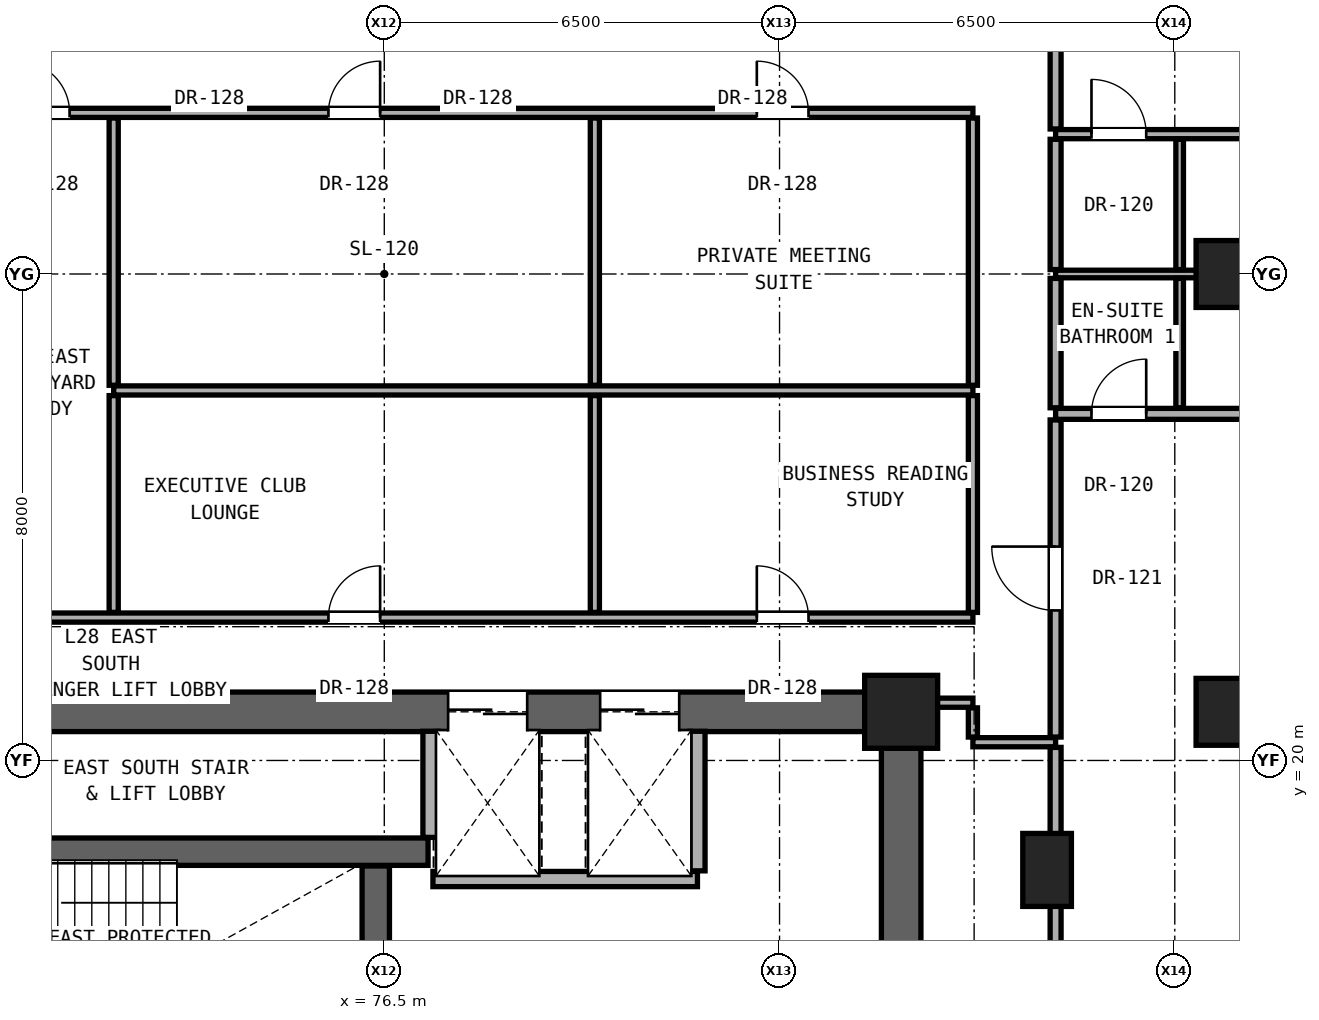
"""IFC4 building model, lengths in metres.
Left out: names, types, materials, properties, quantities, classifications, styles, units other than length and angle.
Written with IfcOpenShell. Run it as: python <this file> out.ifc"""

import sys

from ifc_helpers import new_model, si_unit, direction, frame, frame_2d, origin, origin_2d, place, context, subcontext, project, spatial, rectangle, hollow_rectangle, extrude, element, fill, save


model = new_model("IFC4")
c1 = context("Model", 3, precision=1e-05, world=origin(), true_north=direction((0.0, 1.0)))
c2 = subcontext(c1, "Body", "Model", "MODEL_VIEW")
j1 = project(units=[si_unit("LENGTHUNIT", "METRE"), si_unit("PLANEANGLEUNIT", "RADIAN")], contexts=[c1])
p1 = place(None, origin())
s1 = spatial("IfcSite", under=j1, at=p1, CompositionType="ELEMENT")
p2 = place(p1, origin())
s2 = spatial("IfcBuilding", under=s1, at=p2, CompositionType="ELEMENT")
p3 = place(p2, frame((0.0, 0.0, 101.6)))
s3 = spatial("IfcBuildingStorey", under=s2, at=p3, CompositionType="ELEMENT", Elevation=101.6)
p4 = place(p3, frame((85.0, 20.8, 0.0), z_axis=(0.0, 0.0, 1.0), x_axis=(1.0, 0.0, 0.0)))
e1 = element("IfcColumn", 1, at=p4, inside=s3, PredefinedType="COLUMN", context=c2, shape_type="SweptSolid", body=[
    extrude(rectangle(XDim=1.2, YDim=1.2, at=origin_2d()), origin(), (0.0, 0.0, 1.0), 3.3),
])
for number, where, z_axis, x_axis in (
    (2, (90.4, 20.8, 0.0), (0.0, 0.0, 1.0), (1.0, 0.0, 0.0)),
    (3, (90.4, 28.0, 0.0), (0.0, 0.0, 1.0), (1.0, 0.0, 0.0)),
):
    element("IfcColumn", number, at=place(p3, frame(where, z_axis=z_axis, x_axis=x_axis)), inside=s3, PredefinedType="COLUMN", context=c2, shape_type="SweptSolid", body=[
        extrude(hollow_rectangle(XDim=1.1, YDim=1.1, WallThickness=0.06, at=origin_2d()), origin(), (0.0, 0.0, 1.0), 3.3),
    ])
p5 = place(p3, frame((87.4, 18.2, 0.0), z_axis=(0.0, 0.0, 1.0), x_axis=(1.0, 0.0, 0.0)))
e4 = element("IfcColumn", 4, at=p5, inside=s3, PredefinedType="PILASTER", context=c2, shape_type="SweptSolid", body=[
    extrude(rectangle(XDim=0.8, YDim=1.2, at=origin_2d()), origin(), (0.0, 0.0, 1.0), 3.3),
])
p6 = place(p3, frame((85.0, 15.2, 0.0), z_axis=(0.0, 0.0, 1.0), x_axis=(0.0, 1.0, 0.0)))
e5 = element("IfcWall", 5, at=p6, inside=s3, PredefinedType="SHEAR", context=c2, shape_type="SweptSolid", body=[
    extrude(rectangle(XDim=5.6, YDim=0.65, at=frame_2d((2.8, 0.0))), origin(), (0.0, 0.0, 1.0), 3.08),
])
p7 = place(p3, frame((68.0, 20.8, 0.0), z_axis=(0.0, 0.0, 1.0), x_axis=(1.0, 0.0, 0.0)))
e6 = element("IfcWall", 6, at=p7, inside=s3, PredefinedType="SHEAR", context=c2, shape_type="SweptSolid", body=[
    extrude(rectangle(XDim=17.0, YDim=0.65, at=frame_2d((8.5, 0.0))), origin(), (0.0, 0.0, 1.0), 3.08),
])
p8 = place(p7, frame((9.55, 0.0, 0.0)))
e7 = element("IfcOpeningElement", 7, at=p8, cuts=e6, PredefinedType="OPENING", context=c2, shape_type="SweptSolid", body=[
    extrude(rectangle(XDim=1.3, YDim=2.3, at=frame_2d((0.65, 1.15))), frame((0.0, 0.335, 0.0), z_axis=(0.0, -1.0, 0.0), x_axis=(1.0, 0.0, 0.0)), (0.0, 0.0, 1.0), 0.67),
])
p9 = place(p7, frame((12.05, 0.0, 0.0)))
e8 = element("IfcOpeningElement", 8, at=p9, cuts=e6, PredefinedType="OPENING", context=c2, shape_type="SweptSolid", body=[
    extrude(rectangle(XDim=1.3, YDim=2.3, at=frame_2d((0.65, 1.15))), frame((0.0, 0.335, 0.0), z_axis=(0.0, -1.0, 0.0), x_axis=(1.0, 0.0, 0.0)), (0.0, 0.0, 1.0), 0.67),
])
p10 = place(p3, frame((77.3, 18.05, 0.0), z_axis=(0.0, 0.0, 1.0), x_axis=(1.0, 0.0, 0.0)))
e9 = element("IfcWall", 9, at=p10, inside=s3, PredefinedType="SOLIDWALL", context=c2, shape_type="SweptSolid", body=[
    extrude(rectangle(XDim=4.35, YDim=0.25, at=frame_2d((2.175, 0.0))), origin(), (0.0, 0.0, 1.0), 3.08),
])
p11 = place(p3, frame((68.32, 18.5, 0.0), z_axis=(0.0, 0.0, 1.0), x_axis=(1.0, 0.0, 0.0)))
e10 = element("IfcWall", 10, at=p11, inside=s3, PredefinedType="SHEAR", context=c2, shape_type="SweptSolid", body=[
    extrude(rectangle(XDim=8.9, YDim=0.45, at=frame_2d((4.45, 0.0))), origin(), (0.0, 0.0, 1.0), 3.08),
])
p12 = place(p11, frame((0.495, 0.0, 0.0)))
e11 = element("IfcOpeningElement", 11, at=p12, cuts=e10, PredefinedType="OPENING", context=c2, shape_type="SweptSolid", body=[
    extrude(rectangle(XDim=1.15, YDim=2.2, at=frame_2d((0.575, 1.1))), frame((0.0, 0.235, 0.0), z_axis=(0.0, -1.0, 0.0), x_axis=(1.0, 0.0, 0.0)), (0.0, 0.0, 1.0), 0.47),
])
p13 = place(p3, frame((86.18, 20.3, 0.0), z_axis=(0.0, 0.0, 1.0), x_axis=(1.0, 0.0, 0.0)))
e12 = element("IfcWall", 12, at=p13, inside=s3, PredefinedType="PARTITIONING", context=c2, shape_type="SweptSolid", body=[
    extrude(rectangle(XDim=1.36, YDim=0.15, at=frame_2d((0.68, 0.0))), origin(), (0.0, 0.0, 1.0), 3.08),
])
p14 = place(p3, frame((85.32, 20.95, 0.0), z_axis=(0.0, 0.0, 1.0), x_axis=(1.0, 0.0, 0.0)))
e13 = element("IfcWall", 13, at=p14, inside=s3, PredefinedType="PARTITIONING", context=c2, shape_type="SweptSolid", body=[
    extrude(rectangle(XDim=0.86, YDim=0.15, at=frame_2d((0.43, 0.0))), origin(), (0.0, 0.0, 1.0), 2.472),
])
p15 = place(p3, frame((66.68, 22.35, 0.0), z_axis=(0.0, 0.0, 1.0), x_axis=(1.0, 0.0, 0.0)))
e14 = element("IfcWall", 14, at=p15, inside=s3, PredefinedType="PARTITIONING", context=c2, shape_type="SweptSolid", body=[
    extrude(rectangle(XDim=19.5, YDim=0.15, at=frame_2d((9.75, 0.0))), origin(), (0.0, 0.0, 1.0), 2.145),
])
p16 = place(p15, frame((8.902, 0.0, 0.0)))
e15 = element("IfcOpeningElement", 15, at=p16, cuts=e14, PredefinedType="OPENING", context=c2, shape_type="SweptSolid", body=[
    extrude(rectangle(XDim=0.85, YDim=2.01, at=frame_2d((0.425, 1.005))), frame((0.0, 0.085, 0.0), z_axis=(0.0, -1.0, 0.0), x_axis=(1.0, 0.0, 0.0)), (0.0, 0.0, 1.0), 0.17),
])
p17 = place(p15, frame((15.947, 0.0, 0.0)))
e16 = element("IfcOpeningElement", 16, at=p17, cuts=e14, PredefinedType="OPENING", context=c2, shape_type="SweptSolid", body=[
    extrude(rectangle(XDim=0.85, YDim=2.01, at=frame_2d((0.425, 1.005))), frame((0.0, 0.085, 0.0), z_axis=(0.0, -1.0, 0.0), x_axis=(1.0, 0.0, 0.0)), (0.0, 0.0, 1.0), 0.17),
])
p18 = place(p3, frame((87.54, 25.7, 0.0), z_axis=(0.0, 0.0, 1.0), x_axis=(1.0, 0.0, 0.0)))
e17 = element("IfcWall", 17, at=p18, inside=s3, PredefinedType="PARTITIONING", context=c2, shape_type="SweptSolid", body=[
    extrude(rectangle(XDim=7.054, YDim=0.18, at=frame_2d((3.527, 0.0))), origin(), (0.0, 0.0, 1.0), 2.216),
])
p19 = place(p18, frame((4.052, 0.0, 0.0)))
e18 = element("IfcOpeningElement", 18, at=p19, cuts=e17, PredefinedType="OPENING", context=c2, shape_type="SweptSolid", body=[
    extrude(rectangle(XDim=0.95, YDim=2.15, at=frame_2d((0.475, 1.075))), frame((0.0, 0.1, 0.0), z_axis=(0.0, -1.0, 0.0), x_axis=(1.0, 0.0, 0.0)), (0.0, 0.0, 1.0), 0.2),
])
p20 = place(p18, frame((0.59, 0.0, 0.0)))
e19 = element("IfcOpeningElement", 19, at=p20, cuts=e17, PredefinedType="OPENING", context=c2, shape_type="SweptSolid", body=[
    extrude(rectangle(XDim=0.9, YDim=2.1, at=frame_2d((0.45, 1.05))), frame((0.0, 0.1, 0.0), z_axis=(0.0, -1.0, 0.0), x_axis=(1.0, 0.0, 0.0)), (0.0, 0.0, 1.0), 0.2),
])
p21 = place(p3, frame((72.05, 26.085, 0.0), z_axis=(0.0, 0.0, 1.0), x_axis=(1.0, 0.0, 0.0)))
e20 = element("IfcWall", 20, at=p21, inside=s3, PredefinedType="PARTITIONING", context=c2, shape_type="SweptSolid", body=[
    extrude(rectangle(XDim=14.13, YDim=0.15, at=frame_2d((7.065, 0.0))), origin(), (0.0, 0.0, 1.0), 2.145),
])
p22 = place(p3, frame((87.54, 28.0, 0.0), z_axis=(0.0, 0.0, 1.0), x_axis=(1.0, 0.0, 0.0)))
e21 = element("IfcWall", 21, at=p22, inside=s3, PredefinedType="PARTITIONING", context=c2, shape_type="SweptSolid", body=[
    extrude(rectangle(XDim=7.054, YDim=0.125, at=frame_2d((3.527, 0.0))), origin(), (0.0, 0.0, 1.0), 2.216),
])
p23 = place(p3, frame((87.54, 30.3, 0.0), z_axis=(0.0, 0.0, 1.0), x_axis=(1.0, 0.0, 0.0)))
e22 = element("IfcWall", 22, at=p23, inside=s3, PredefinedType="PARTITIONING", context=c2, shape_type="SweptSolid", body=[
    extrude(rectangle(XDim=7.054, YDim=0.15, at=frame_2d((3.527, 0.0))), origin(), (0.0, 0.0, 1.0), 2.216),
])
p24 = place(p23, frame((4.052, 0.0, 0.0)))
e23 = element("IfcOpeningElement", 23, at=p24, cuts=e22, PredefinedType="OPENING", context=c2, shape_type="SweptSolid", body=[
    extrude(rectangle(XDim=0.95, YDim=2.15, at=frame_2d((0.475, 1.075))), frame((0.0, 0.085, 0.0), z_axis=(0.0, -1.0, 0.0), x_axis=(1.0, 0.0, 0.0)), (0.0, 0.0, 1.0), 0.17),
])
p25 = place(p23, frame((0.59, 0.0, 0.0)))
e24 = element("IfcOpeningElement", 24, at=p25, cuts=e22, PredefinedType="OPENING", context=c2, shape_type="SweptSolid", body=[
    extrude(rectangle(XDim=0.9, YDim=2.1, at=frame_2d((0.45, 1.05))), frame((0.0, 0.085, 0.0), z_axis=(0.0, -1.0, 0.0), x_axis=(1.0, 0.0, 0.0)), (0.0, 0.0, 1.0), 0.17),
])
p26 = place(p3, frame((66.68, 30.65, 0.0), z_axis=(0.0, 0.0, 1.0), x_axis=(1.0, 0.0, 0.0)))
e25 = element("IfcWall", 25, at=p26, inside=s3, PredefinedType="PARTITIONING", context=c2, shape_type="SweptSolid", body=[
    extrude(rectangle(XDim=19.5, YDim=0.15, at=frame_2d((9.75, 0.0))), origin(), (0.0, 0.0, 1.0), 2.145),
])
p27 = place(p26, frame((3.795, 0.0, 0.0)))
e26 = element("IfcOpeningElement", 26, at=p27, cuts=e25, PredefinedType="OPENING", context=c2, shape_type="SweptSolid", body=[
    extrude(rectangle(XDim=0.85, YDim=2.01, at=frame_2d((0.425, 1.005))), frame((0.0, 0.085, 0.0), z_axis=(0.0, -1.0, 0.0), x_axis=(1.0, 0.0, 0.0)), (0.0, 0.0, 1.0), 0.17),
])
p28 = place(p26, frame((8.902, 0.0, 0.0)))
e27 = element("IfcOpeningElement", 27, at=p28, cuts=e25, PredefinedType="OPENING", context=c2, shape_type="SweptSolid", body=[
    extrude(rectangle(XDim=0.85, YDim=2.01, at=frame_2d((0.425, 1.005))), frame((0.0, 0.085, 0.0), z_axis=(0.0, -1.0, 0.0), x_axis=(1.0, 0.0, 0.0)), (0.0, 0.0, 1.0), 0.17),
])
p29 = place(p26, frame((15.947, 0.0, 0.0)))
e28 = element("IfcOpeningElement", 28, at=p29, cuts=e25, PredefinedType="OPENING", context=c2, shape_type="SweptSolid", body=[
    extrude(rectangle(XDim=0.85, YDim=2.01, at=frame_2d((0.425, 1.005))), frame((0.0, 0.085, 0.0), z_axis=(0.0, -1.0, 0.0), x_axis=(1.0, 0.0, 0.0)), (0.0, 0.0, 1.0), 0.17),
])
p30 = place(p3, frame((72.05, 22.435, 0.0), z_axis=(0.0, 0.0, 1.0), x_axis=(0.0, 1.0, 0.0)))
e29 = element("IfcWall", 29, at=p30, inside=s3, PredefinedType="PARTITIONING", context=c2, shape_type="SweptSolid", body=[
    extrude(rectangle(XDim=3.565, YDim=0.15, at=frame_2d((1.782, 0.0))), origin(), (0.0, 0.0, 1.0), 2.609),
])
p31 = place(p3, frame((72.05, 26.17, 0.0), z_axis=(0.0, 0.0, 1.0), x_axis=(0.0, 1.0, 0.0)))
e30 = element("IfcWall", 30, at=p31, inside=s3, PredefinedType="PARTITIONING", context=c2, shape_type="SweptSolid", body=[
    extrude(rectangle(XDim=4.395, YDim=0.15, at=frame_2d((2.198, 0.0))), origin(), (0.0, 0.0, 1.0), 2.145),
])
p32 = place(p3, frame((76.36, 15.815, 0.0), z_axis=(0.0, 0.0, 1.0), x_axis=(0.0, 1.0, 0.0)))
e31 = element("IfcWall", 31, at=p32, inside=s3, PredefinedType="SHEAR", context=c2, shape_type="SweptSolid", body=[
    extrude(rectangle(XDim=2.45, YDim=0.45, at=frame_2d((1.225, 0.0))), origin(), (0.0, 0.0, 1.0), 3.08),
])
p33 = place(p3, frame((77.26, 18.735, 0.0), z_axis=(0.0, 0.0, 1.0), x_axis=(0.0, 1.0, 0.0)))
e32 = element("IfcWall", 32, at=p33, inside=s3, PredefinedType="SOLIDWALL", context=c2, shape_type="SweptSolid", body=[
    extrude(rectangle(XDim=1.745, YDim=0.25, at=frame_2d((0.873, 0.0))), origin(), (0.0, 0.0, 1.0), 3.08),
])
p34 = place(p3, frame((79.963, 22.435, 0.0), z_axis=(0.0, 0.0, 1.0), x_axis=(0.0, 1.0, 0.0)))
e33 = element("IfcWall", 33, at=p34, inside=s3, PredefinedType="PARTITIONING", context=c2, shape_type="SweptSolid", body=[
    extrude(rectangle(XDim=3.565, YDim=0.15, at=frame_2d((1.782, 0.0))), origin(), (0.0, 0.0, 1.0), 3.08),
])
p35 = place(p3, frame((79.963, 26.17, 0.0), z_axis=(0.0, 0.0, 1.0), x_axis=(0.0, 1.0, 0.0)))
e34 = element("IfcWall", 34, at=p35, inside=s3, PredefinedType="PARTITIONING", context=c2, shape_type="SweptSolid", body=[
    extrude(rectangle(XDim=4.395, YDim=0.15, at=frame_2d((2.198, 0.0))), origin(), (0.0, 0.0, 1.0), 2.145),
])
p36 = place(p3, frame((81.65, 18.185, 0.0), z_axis=(0.0, 0.0, 1.0), x_axis=(0.0, 1.0, 0.0)))
e35 = element("IfcWall", 35, at=p36, inside=s3, PredefinedType="SOLIDWALL", context=c2, shape_type="SweptSolid", body=[
    extrude(rectangle(XDim=2.295, YDim=0.25, at=frame_2d((1.147, 0.0))), origin(), (0.0, 0.0, 1.0), 3.08),
])
p37 = place(p3, frame((86.18, 20.385, 0.0), z_axis=(0.0, 0.0, 1.0), x_axis=(0.0, 1.0, 0.0)))
e36 = element("IfcWall", 36, at=p37, inside=s3, PredefinedType="PARTITIONING", context=c2, shape_type="SweptSolid", body=[
    extrude(rectangle(XDim=0.48, YDim=0.15, at=frame_2d((0.24, 0.0))), origin(), (0.0, 0.0, 1.0), 2.472),
])
p38 = place(p3, frame((86.18, 22.435, 0.0), z_axis=(0.0, 0.0, 1.0), x_axis=(0.0, 1.0, 0.0)))
e37 = element("IfcWall", 37, at=p38, inside=s3, PredefinedType="PARTITIONING", context=c2, shape_type="SweptSolid", body=[
    extrude(rectangle(XDim=3.565, YDim=0.15, at=frame_2d((1.782, 0.0))), origin(), (0.0, 0.0, 1.0), 3.08),
])
p39 = place(p3, frame((86.18, 26.17, 0.0), z_axis=(0.0, 0.0, 1.0), x_axis=(0.0, 1.0, 0.0)))
e38 = element("IfcWall", 38, at=p39, inside=s3, PredefinedType="PARTITIONING", context=c2, shape_type="SweptSolid", body=[
    extrude(rectangle(XDim=4.395, YDim=0.15, at=frame_2d((2.198, 0.0))), origin(), (0.0, 0.0, 1.0), 2.299),
])
p40 = place(p3, frame((87.54, 16.686, 0.0), z_axis=(0.0, 0.0, 1.0), x_axis=(0.0, 1.0, 0.0)))
e39 = element("IfcWall", 39, at=p40, inside=s3, PredefinedType="PARTITIONING", context=c2, shape_type="SweptSolid", body=[
    extrude(rectangle(XDim=3.529, YDim=0.18, at=frame_2d((1.765, 0.0))), origin(), (0.0, 0.0, 1.0), 2.456),
])
p41 = place(p3, frame((87.54, 20.385, 0.0), z_axis=(0.0, 0.0, 1.0), x_axis=(0.0, 1.0, 0.0)))
e40 = element("IfcWall", 40, at=p41, inside=s3, PredefinedType="PARTITIONING", context=c2, shape_type="SweptSolid", body=[
    extrude(rectangle(XDim=5.215, YDim=0.18, at=frame_2d((2.607, 0.0))), origin(), (0.0, 0.0, 1.0), 2.472),
])
p42 = place(p41, frame((2.083, 0.0, 0.0)))
e41 = element("IfcOpeningElement", 41, at=p42, cuts=e40, PredefinedType="OPENING", context=c2, shape_type="SweptSolid", body=[
    extrude(rectangle(XDim=1.05, YDim=2.2, at=frame_2d((0.525, 1.1))), frame((0.0, 0.1, 0.0), z_axis=(0.0, -1.0, 0.0), x_axis=(1.0, 0.0, 0.0)), (0.0, 0.0, 1.0), 0.2),
])
p43 = place(p3, frame((87.54, 25.8, 0.0), z_axis=(0.0, 0.0, 1.0), x_axis=(0.0, 1.0, 0.0)))
e42 = element("IfcWall", 42, at=p43, inside=s3, PredefinedType="PARTITIONING", context=c2, shape_type="SweptSolid", body=[
    extrude(rectangle(XDim=2.127, YDim=0.18, at=frame_2d((1.064, 0.0))), origin(), (0.0, 0.0, 1.0), 2.299),
])
p44 = place(p3, frame((87.54, 28.073, 0.0), z_axis=(0.0, 0.0, 1.0), x_axis=(0.0, 1.0, 0.0)))
e43 = element("IfcWall", 43, at=p44, inside=s3, PredefinedType="PARTITIONING", context=c2, shape_type="SweptSolid", body=[
    extrude(rectangle(XDim=2.143, YDim=0.18, at=frame_2d((1.071, 0.0))), origin(), (0.0, 0.0, 1.0), 2.299),
])
p45 = place(p3, frame((87.54, 30.385, 0.0), z_axis=(0.0, 0.0, 1.0), x_axis=(0.0, 1.0, 0.0)))
e44 = element("IfcWall", 44, at=p45, inside=s3, PredefinedType="PARTITIONING", context=c2, shape_type="SweptSolid", body=[
    extrude(rectangle(XDim=5.23, YDim=0.18, at=frame_2d((2.615, 0.0))), origin(), (0.0, 0.0, 1.0), 2.472),
])
p46 = place(p45, frame((2.09, 0.0, 0.0)))
e45 = element("IfcOpeningElement", 45, at=p46, cuts=e44, PredefinedType="OPENING", context=c2, shape_type="SweptSolid", body=[
    extrude(rectangle(XDim=1.05, YDim=2.2, at=frame_2d((0.525, 1.1))), frame((0.0, 0.1, 0.0), z_axis=(0.0, -1.0, 0.0), x_axis=(1.0, 0.0, 0.0)), (0.0, 0.0, 1.0), 0.2),
])
p47 = place(p3, frame((89.58, 25.8, 0.0), z_axis=(0.0, 0.0, 1.0), x_axis=(0.0, 1.0, 0.0)))
e46 = element("IfcWall", 46, at=p47, inside=s3, PredefinedType="PARTITIONING", context=c2, shape_type="SweptSolid", body=[
    extrude(rectangle(XDim=2.127, YDim=0.125, at=frame_2d((1.064, 0.0))), origin(), (0.0, 0.0, 1.0), 2.299),
])
p48 = place(p3, frame((89.58, 28.073, 0.0), z_axis=(0.0, 0.0, 1.0), x_axis=(0.0, 1.0, 0.0)))
e47 = element("IfcWall", 47, at=p48, inside=s3, PredefinedType="PARTITIONING", context=c2, shape_type="SweptSolid", body=[
    extrude(rectangle(XDim=2.143, YDim=0.125, at=frame_2d((1.071, 0.0))), origin(), (0.0, 0.0, 1.0), 2.299),
])
p49 = place(p42, origin())
e48 = element("IfcDoor", 48, at=p49, inside=s3, OperationType="SINGLE_SWING_RIGHT", PredefinedType="DOOR", context=c2, shape_type="SweptSolid", body=[
    extrude(rectangle(XDim=1.05, YDim=2.2, at=frame_2d((0.525, 1.1))), frame((0.0, 0.025, 0.0), z_axis=(0.0, -1.0, 0.0), x_axis=(1.0, 0.0, 0.0)), (0.0, 0.0, 1.0), 0.05),
])
fill(e41, e48)
p50 = place(p20, origin())
e49 = element("IfcDoor", 49, at=p50, inside=s3, OperationType="SINGLE_SWING_RIGHT", PredefinedType="DOOR", context=c2, shape_type="SweptSolid", body=[
    extrude(rectangle(XDim=0.9, YDim=2.1, at=frame_2d((0.45, 1.05))), frame((0.0, 0.025, 0.0), z_axis=(0.0, -1.0, 0.0), x_axis=(1.0, 0.0, 0.0)), (0.0, 0.0, 1.0), 0.05),
])
fill(e19, e49)
p51 = place(p25, origin())
e50 = element("IfcDoor", 50, at=p51, inside=s3, OperationType="SINGLE_SWING_LEFT", PredefinedType="DOOR", context=c2, shape_type="SweptSolid", body=[
    extrude(rectangle(XDim=0.9, YDim=2.1, at=frame_2d((0.45, 1.05))), frame((0.0, 0.025, 0.0), z_axis=(0.0, -1.0, 0.0), x_axis=(1.0, 0.0, 0.0)), (0.0, 0.0, 1.0), 0.05),
])
fill(e24, e50)
p52 = place(p27, origin())
e51 = element("IfcDoor", 51, at=p52, inside=s3, OperationType="SINGLE_SWING_LEFT", PredefinedType="DOOR", context=c2, shape_type="SweptSolid", body=[
    extrude(rectangle(XDim=0.85, YDim=2.01, at=frame_2d((0.425, 1.005))), frame((0.0, 0.025, 0.0), z_axis=(0.0, -1.0, 0.0), x_axis=(1.0, 0.0, 0.0)), (0.0, 0.0, 1.0), 0.05),
])
fill(e26, e51)
p53 = place(p16, origin())
e52 = element("IfcDoor", 52, at=p53, inside=s3, OperationType="SINGLE_SWING_RIGHT", PredefinedType="DOOR", context=c2, shape_type="SweptSolid", body=[
    extrude(rectangle(XDim=0.85, YDim=2.01, at=frame_2d((0.425, 1.005))), frame((0.0, 0.025, 0.0), z_axis=(0.0, -1.0, 0.0), x_axis=(1.0, 0.0, 0.0)), (0.0, 0.0, 1.0), 0.05),
])
fill(e15, e52)
p54 = place(p17, origin())
e53 = element("IfcDoor", 53, at=p54, inside=s3, OperationType="SINGLE_SWING_LEFT", PredefinedType="DOOR", context=c2, shape_type="SweptSolid", body=[
    extrude(rectangle(XDim=0.85, YDim=2.01, at=frame_2d((0.425, 1.005))), frame((0.0, 0.025, 0.0), z_axis=(0.0, -1.0, 0.0), x_axis=(1.0, 0.0, 0.0)), (0.0, 0.0, 1.0), 0.05),
])
fill(e16, e53)
p55 = place(p28, origin())
e54 = element("IfcDoor", 54, at=p55, inside=s3, OperationType="SINGLE_SWING_RIGHT", PredefinedType="DOOR", context=c2, shape_type="SweptSolid", body=[
    extrude(rectangle(XDim=0.85, YDim=2.01, at=frame_2d((0.425, 1.005))), frame((0.0, 0.025, 0.0), z_axis=(0.0, -1.0, 0.0), x_axis=(1.0, 0.0, 0.0)), (0.0, 0.0, 1.0), 0.05),
])
fill(e27, e54)
p56 = place(p29, origin())
e55 = element("IfcDoor", 55, at=p56, inside=s3, OperationType="SINGLE_SWING_LEFT", PredefinedType="DOOR", context=c2, shape_type="SweptSolid", body=[
    extrude(rectangle(XDim=0.85, YDim=2.01, at=frame_2d((0.425, 1.005))), frame((0.0, 0.025, 0.0), z_axis=(0.0, -1.0, 0.0), x_axis=(1.0, 0.0, 0.0)), (0.0, 0.0, 1.0), 0.05),
])
fill(e28, e55)
p57 = place(p8, origin())
e56 = element("IfcDoor", 56, at=p57, inside=s3, OperationType="DOUBLE_DOOR_SLIDING", PredefinedType="DOOR", context=c2, shape_type="SweptSolid", body=[
    extrude(rectangle(XDim=1.3, YDim=2.3, at=frame_2d((0.65, 1.15))), frame((0.0, 0.025, 0.0), z_axis=(0.0, -1.0, 0.0), x_axis=(1.0, 0.0, 0.0)), (0.0, 0.0, 1.0), 0.05),
])
fill(e7, e56)
p58 = place(p9, origin())
e57 = element("IfcDoor", 57, at=p58, inside=s3, OperationType="DOUBLE_DOOR_SLIDING", PredefinedType="DOOR", context=c2, shape_type="SweptSolid", body=[
    extrude(rectangle(XDim=1.3, YDim=2.3, at=frame_2d((0.65, 1.15))), frame((0.0, 0.025, 0.0), z_axis=(0.0, -1.0, 0.0), x_axis=(1.0, 0.0, 0.0)), (0.0, 0.0, 1.0), 0.05),
])
fill(e8, e57)
save(model, sys.argv[1])
